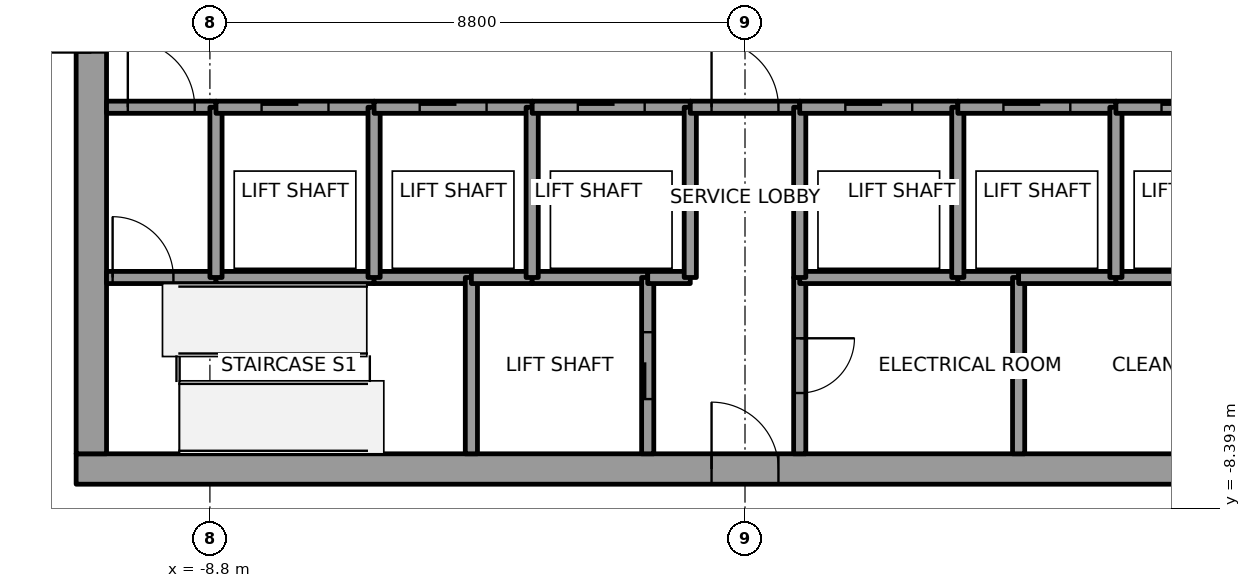
"""IFC4 building model, lengths in metres.
Left out: names, types, materials, properties, quantities, classifications, styles, units other than length and angle.
Written with IfcOpenShell. Run it as: python <this file> out.ifc"""

import sys

from ifc_helpers import new_model, si_unit, direction, frame, frame_2d, origin, place, context, subcontext, project, spatial, rectangle, extrude, element, fill, save


model = new_model("IFC4")
c1 = context("Model", 3, precision=1e-05, world=origin(), true_north=direction((0.0, 1.0)))
c2 = subcontext(c1, "Body", "Model", "MODEL_VIEW")
j1 = project(units=[si_unit("LENGTHUNIT", "METRE"), si_unit("PLANEANGLEUNIT", "RADIAN")], contexts=[c1])
p1 = place(None, origin())
s1 = spatial("IfcSite", under=j1, at=p1, CompositionType="ELEMENT")
p2 = place(p1, origin())
s2 = spatial("IfcBuilding", under=s1, at=p2, CompositionType="ELEMENT")
p3 = place(p2, frame((0.0, 0.0, 235.0)))
s3 = spatial("IfcBuildingStorey", under=s2, at=p3, CompositionType="ELEMENT", Elevation=235.0)
p4 = place(p3, frame((-11.0, -7.75, 0.0), z_axis=(0.0, 0.0, 1.0), x_axis=(1.0, 0.0, 0.0)))
e1 = element("IfcWall", 1, at=p4, inside=s3, PredefinedType="SHEAR", context=c2, shape_type="SweptSolid", body=[
    extrude(rectangle(XDim=22.0, YDim=0.5, at=frame_2d((11.0, 0.0))), origin(), (0.0, 0.0, 1.0), 4.0),
])
p5 = place(p4, frame((10.45, 0.0, 0.0)))
e2 = element("IfcOpeningElement", 2, at=p5, cuts=e1, PredefinedType="OPENING", context=c2, shape_type="SweptSolid", body=[
    extrude(rectangle(XDim=1.1, YDim=2.1, at=frame_2d((0.55, 1.05))), frame((0.0, 0.25, 0.0), z_axis=(0.0, -1.0, 0.0), x_axis=(1.0, 0.0, 0.0)), (0.0, 0.0, 1.0), 0.5),
])
p6 = place(p3, frame((-10.75, -7.5, 0.0), z_axis=(0.0, 0.0, 1.0), x_axis=(0.0, 1.0, 0.0)))
e3 = element("IfcWall", 3, at=p6, inside=s3, PredefinedType="SHEAR", context=c2, shape_type="SweptSolid", body=[
    extrude(rectangle(XDim=15.0, YDim=0.5, at=frame_2d((7.5, 0.0))), origin(), (0.0, 0.0, 1.0), 4.0),
])
p7 = place(p6, frame((6.6, 0.0, 0.0)))
e4 = element("IfcOpeningElement", 4, at=p7, cuts=e3, PredefinedType="OPENING", context=c2, shape_type="SweptSolid", body=[
    extrude(rectangle(XDim=1.8, YDim=2.1, at=frame_2d((0.9, 1.05))), frame((0.0, 0.25, 0.0), z_axis=(0.0, -1.0, 0.0), x_axis=(1.0, 0.0, 0.0)), (0.0, 0.0, 1.0), 0.5),
])
p8 = place(p3, frame((-10.5, -4.6, 0.0), z_axis=(0.0, 0.0, 1.0), x_axis=(1.0, 0.0, 0.0)))
e5 = element("IfcWall", 5, at=p8, inside=s3, PredefinedType="SOLIDWALL", context=c2, shape_type="SweptSolid", body=[
    extrude(rectangle(XDim=1.8, YDim=0.2, at=frame_2d((0.9, 0.0))), origin(), (0.0, 0.0, 1.0), 3.85),
])
p9 = place(p8, frame((0.1, 0.0, 0.0)))
e6 = element("IfcOpeningElement", 6, at=p9, cuts=e5, PredefinedType="OPENING", context=c2, shape_type="SweptSolid", body=[
    extrude(rectangle(XDim=1.0, YDim=2.1, at=frame_2d((0.5, 1.05))), frame((0.0, 0.1, 0.0), z_axis=(0.0, -1.0, 0.0), x_axis=(1.0, 0.0, 0.0)), (0.0, 0.0, 1.0), 0.2),
])
p10 = place(p3, frame((-10.5, -1.8, 0.0), z_axis=(0.0, 0.0, 1.0), x_axis=(1.0, 0.0, 0.0)))
e7 = element("IfcWall", 7, at=p10, inside=s3, PredefinedType="SOLIDWALL", context=c2, shape_type="SweptSolid", body=[
    extrude(rectangle(XDim=1.8, YDim=0.2, at=frame_2d((0.9, 0.0))), origin(), (0.0, 0.0, 1.0), 3.85),
])
p11 = place(p10, frame((0.35, 0.0, 0.0)))
e8 = element("IfcOpeningElement", 8, at=p11, cuts=e7, PredefinedType="OPENING", context=c2, shape_type="SweptSolid", body=[
    extrude(rectangle(XDim=1.1, YDim=2.1, at=frame_2d((0.55, 1.05))), frame((0.0, 0.1, 0.0), z_axis=(0.0, -1.0, 0.0), x_axis=(1.0, 0.0, 0.0)), (0.0, 0.0, 1.0), 0.2),
])
p12 = place(p3, frame((-8.7, -4.6, 0.0), z_axis=(0.0, 0.0, 1.0), x_axis=(1.0, 0.0, 0.0)))
e9 = element("IfcWall", 9, at=p12, inside=s3, PredefinedType="SOLIDWALL", context=c2, shape_type="SweptSolid", body=[
    extrude(rectangle(XDim=2.6, YDim=0.2, at=frame_2d((1.3, 0.0))), origin(), (0.0, 0.0, 1.0), 3.85),
])
p13 = place(p3, frame((-8.7, -4.6, 0.0), z_axis=(0.0, 0.0, 1.0), x_axis=(0.0, 1.0, 0.0)))
e10 = element("IfcWall", 10, at=p13, inside=s3, PredefinedType="SOLIDWALL", context=c2, shape_type="SweptSolid", body=[
    extrude(rectangle(XDim=2.8, YDim=0.2, at=frame_2d((1.4, 0.0))), origin(), (0.0, 0.0, 1.0), 3.85),
])
p14 = place(p3, frame((-8.7, -1.8, 0.0), z_axis=(0.0, 0.0, 1.0), x_axis=(1.0, 0.0, 0.0)))
e11 = element("IfcWall", 11, at=p14, inside=s3, PredefinedType="SOLIDWALL", context=c2, shape_type="SweptSolid", body=[
    extrude(rectangle(XDim=2.6, YDim=0.2, at=frame_2d((1.3, 0.0))), origin(), (0.0, 0.0, 1.0), 3.85),
])
p15 = place(p14, frame((0.75, 0.0, 0.0)))
e12 = element("IfcOpeningElement", 12, at=p15, cuts=e11, PredefinedType="OPENING", context=c2, shape_type="SweptSolid", body=[
    extrude(rectangle(XDim=1.1, YDim=2.1, at=frame_2d((0.55, 1.05))), frame((0.0, 0.1, 0.0), z_axis=(0.0, -1.0, 0.0), x_axis=(1.0, 0.0, 0.0)), (0.0, 0.0, 1.0), 0.2),
])
p16 = place(p3, frame((-6.1, -4.6, 0.0), z_axis=(0.0, 0.0, 1.0), x_axis=(1.0, 0.0, 0.0)))
e13 = element("IfcWall", 13, at=p16, inside=s3, PredefinedType="SOLIDWALL", context=c2, shape_type="SweptSolid", body=[
    extrude(rectangle(XDim=1.6, YDim=0.2, at=frame_2d((0.8, 0.0))), origin(), (0.0, 0.0, 1.0), 3.85),
])
p17 = place(p3, frame((-6.1, -4.6, 0.0), z_axis=(0.0, 0.0, 1.0), x_axis=(0.0, 1.0, 0.0)))
e14 = element("IfcWall", 14, at=p17, inside=s3, PredefinedType="SOLIDWALL", context=c2, shape_type="SweptSolid", body=[
    extrude(rectangle(XDim=2.8, YDim=0.2, at=frame_2d((1.4, 0.0))), origin(), (0.0, 0.0, 1.0), 3.85),
])
p18 = place(p3, frame((-6.1, -1.8, 0.0), z_axis=(0.0, 0.0, 1.0), x_axis=(1.0, 0.0, 0.0)))
e15 = element("IfcWall", 15, at=p18, inside=s3, PredefinedType="SOLIDWALL", context=c2, shape_type="SweptSolid", body=[
    extrude(rectangle(XDim=2.6, YDim=0.2, at=frame_2d((1.3, 0.0))), origin(), (0.0, 0.0, 1.0), 3.85),
])
p19 = place(p18, frame((0.75, 0.0, 0.0)))
e16 = element("IfcOpeningElement", 16, at=p19, cuts=e15, PredefinedType="OPENING", context=c2, shape_type="SweptSolid", body=[
    extrude(rectangle(XDim=1.1, YDim=2.1, at=frame_2d((0.55, 1.05))), frame((0.0, 0.1, 0.0), z_axis=(0.0, -1.0, 0.0), x_axis=(1.0, 0.0, 0.0)), (0.0, 0.0, 1.0), 0.2),
])
p20 = place(p3, frame((-4.5, -4.6, 0.0), z_axis=(0.0, 0.0, 1.0), x_axis=(0.0, -1.0, 0.0)))
e17 = element("IfcWall", 17, at=p20, inside=s3, PredefinedType="SOLIDWALL", context=c2, shape_type="SweptSolid", body=[
    extrude(rectangle(XDim=2.9, YDim=0.2, at=frame_2d((1.45, 0.0))), origin(), (0.0, 0.0, 1.0), 3.85),
])
p21 = place(p3, frame((-4.5, -4.6, 0.0), z_axis=(0.0, 0.0, 1.0), x_axis=(1.0, 0.0, 0.0)))
e18 = element("IfcWall", 18, at=p21, inside=s3, PredefinedType="SOLIDWALL", context=c2, shape_type="SweptSolid", body=[
    extrude(rectangle(XDim=1.0, YDim=0.2, at=frame_2d((0.5, 0.0))), origin(), (0.0, 0.0, 1.0), 3.85),
])
p22 = place(p3, frame((-3.5, -4.6, 0.0), z_axis=(0.0, 0.0, 1.0), x_axis=(1.0, 0.0, 0.0)))
e19 = element("IfcWall", 19, at=p22, inside=s3, PredefinedType="SOLIDWALL", context=c2, shape_type="SweptSolid", body=[
    extrude(rectangle(XDim=1.9, YDim=0.2, at=frame_2d((0.95, 0.0))), origin(), (0.0, 0.0, 1.0), 3.85),
])
p23 = place(p3, frame((-3.5, -4.6, 0.0), z_axis=(0.0, 0.0, 1.0), x_axis=(0.0, 1.0, 0.0)))
e20 = element("IfcWall", 20, at=p23, inside=s3, PredefinedType="SOLIDWALL", context=c2, shape_type="SweptSolid", body=[
    extrude(rectangle(XDim=2.8, YDim=0.2, at=frame_2d((1.4, 0.0))), origin(), (0.0, 0.0, 1.0), 3.85),
])
p24 = place(p3, frame((-3.5, -1.8, 0.0), z_axis=(0.0, 0.0, 1.0), x_axis=(1.0, 0.0, 0.0)))
e21 = element("IfcWall", 21, at=p24, inside=s3, PredefinedType="SOLIDWALL", context=c2, shape_type="SweptSolid", body=[
    extrude(rectangle(XDim=2.6, YDim=0.2, at=frame_2d((1.3, 0.0))), origin(), (0.0, 0.0, 1.0), 3.85),
])
p25 = place(p24, frame((0.75, 0.0, 0.0)))
e22 = element("IfcOpeningElement", 22, at=p25, cuts=e21, PredefinedType="OPENING", context=c2, shape_type="SweptSolid", body=[
    extrude(rectangle(XDim=1.1, YDim=2.1, at=frame_2d((0.55, 1.05))), frame((0.0, 0.1, 0.0), z_axis=(0.0, -1.0, 0.0), x_axis=(1.0, 0.0, 0.0)), (0.0, 0.0, 1.0), 0.2),
])
p26 = place(p3, frame((-1.6, -7.5, 0.0), z_axis=(0.0, 0.0, 1.0), x_axis=(0.0, 1.0, 0.0)))
e23 = element("IfcWall", 23, at=p26, inside=s3, PredefinedType="SOLIDWALL", context=c2, shape_type="SweptSolid", body=[
    extrude(rectangle(XDim=2.9, YDim=0.2, at=frame_2d((1.45, 0.0))), origin(), (0.0, 0.0, 1.0), 3.85),
])
p27 = place(p26, frame((0.9, 0.0, 0.0)))
e24 = element("IfcOpeningElement", 24, at=p27, cuts=e23, PredefinedType="OPENING", context=c2, shape_type="SweptSolid", body=[
    extrude(rectangle(XDim=1.1, YDim=2.1, at=frame_2d((0.55, 1.05))), frame((0.0, 0.1, 0.0), z_axis=(0.0, -1.0, 0.0), x_axis=(1.0, 0.0, 0.0)), (0.0, 0.0, 1.0), 0.2),
])
p28 = place(p3, frame((-1.6, -4.6, 0.0), z_axis=(0.0, 0.0, 1.0), x_axis=(1.0, 0.0, 0.0)))
e25 = element("IfcWall", 25, at=p28, inside=s3, PredefinedType="SOLIDWALL", context=c2, shape_type="SweptSolid", body=[
    extrude(rectangle(XDim=0.7, YDim=0.2, at=frame_2d((0.35, 0.0))), origin(), (0.0, 0.0, 1.0), 3.85),
])
p29 = place(p3, frame((-0.9, -4.6, 0.0), z_axis=(0.0, 0.0, 1.0), x_axis=(0.0, 1.0, 0.0)))
e26 = element("IfcWall", 26, at=p29, inside=s3, PredefinedType="SOLIDWALL", context=c2, shape_type="SweptSolid", body=[
    extrude(rectangle(XDim=2.8, YDim=0.2, at=frame_2d((1.4, 0.0))), origin(), (0.0, 0.0, 1.0), 3.85),
])
p30 = place(p3, frame((-0.9, -1.8, 0.0), z_axis=(0.0, 0.0, 1.0), x_axis=(1.0, 0.0, 0.0)))
e27 = element("IfcWall", 27, at=p30, inside=s3, PredefinedType="SOLIDWALL", context=c2, shape_type="SweptSolid", body=[
    extrude(rectangle(XDim=1.8, YDim=0.2, at=frame_2d((0.9, 0.0))), origin(), (0.0, 0.0, 1.0), 3.85),
])
p31 = place(p30, frame((0.35, 0.0, 0.0)))
e28 = element("IfcOpeningElement", 28, at=p31, cuts=e27, PredefinedType="OPENING", context=c2, shape_type="SweptSolid", body=[
    extrude(rectangle(XDim=1.1, YDim=2.1, at=frame_2d((0.55, 1.05))), frame((0.0, 0.1, 0.0), z_axis=(0.0, -1.0, 0.0), x_axis=(1.0, 0.0, 0.0)), (0.0, 0.0, 1.0), 0.2),
])
p32 = place(p3, frame((0.9, -4.6, 0.0), z_axis=(0.0, 0.0, 1.0), x_axis=(0.0, -1.0, 0.0)))
e29 = element("IfcWall", 29, at=p32, inside=s3, PredefinedType="SOLIDWALL", context=c2, shape_type="SweptSolid", body=[
    extrude(rectangle(XDim=2.9, YDim=0.2, at=frame_2d((1.45, 0.0))), origin(), (0.0, 0.0, 1.0), 3.85),
])
p33 = place(p32, frame((1.0, 0.0, 0.0)))
e30 = element("IfcOpeningElement", 30, at=p33, cuts=e29, PredefinedType="OPENING", context=c2, shape_type="SweptSolid", body=[
    extrude(rectangle(XDim=0.9, YDim=2.1, at=frame_2d((0.45, 1.05))), frame((0.0, 0.1, 0.0), z_axis=(0.0, -1.0, 0.0), x_axis=(1.0, 0.0, 0.0)), (0.0, 0.0, 1.0), 0.2),
])
p34 = place(p3, frame((3.5, -4.6, 0.0), z_axis=(0.0, 0.0, 1.0), x_axis=(-1.0, 0.0, 0.0)))
e31 = element("IfcWall", 31, at=p34, inside=s3, PredefinedType="SOLIDWALL", context=c2, shape_type="SweptSolid", body=[
    extrude(rectangle(XDim=2.6, YDim=0.2, at=frame_2d((1.3, 0.0))), origin(), (0.0, 0.0, 1.0), 3.85),
])
p35 = place(p3, frame((0.9, -1.8, 0.0), z_axis=(0.0, 0.0, 1.0), x_axis=(0.0, -1.0, 0.0)))
e32 = element("IfcWall", 32, at=p35, inside=s3, PredefinedType="SOLIDWALL", context=c2, shape_type="SweptSolid", body=[
    extrude(rectangle(XDim=2.8, YDim=0.2, at=frame_2d((1.4, 0.0))), origin(), (0.0, 0.0, 1.0), 3.85),
])
p36 = place(p3, frame((0.9, -1.8, 0.0), z_axis=(0.0, 0.0, 1.0), x_axis=(1.0, 0.0, 0.0)))
e33 = element("IfcWall", 33, at=p36, inside=s3, PredefinedType="SOLIDWALL", context=c2, shape_type="SweptSolid", body=[
    extrude(rectangle(XDim=2.6, YDim=0.2, at=frame_2d((1.3, 0.0))), origin(), (0.0, 0.0, 1.0), 3.85),
])
p37 = place(p36, frame((0.75, 0.0, 0.0)))
e34 = element("IfcOpeningElement", 34, at=p37, cuts=e33, PredefinedType="OPENING", context=c2, shape_type="SweptSolid", body=[
    extrude(rectangle(XDim=1.1, YDim=2.1, at=frame_2d((0.55, 1.05))), frame((0.0, 0.1, 0.0), z_axis=(0.0, -1.0, 0.0), x_axis=(1.0, 0.0, 0.0)), (0.0, 0.0, 1.0), 0.2),
])
p38 = place(p3, frame((4.5, -4.6, 0.0), z_axis=(0.0, 0.0, 1.0), x_axis=(-1.0, 0.0, 0.0)))
e35 = element("IfcWall", 35, at=p38, inside=s3, PredefinedType="SOLIDWALL", context=c2, shape_type="SweptSolid", body=[
    extrude(rectangle(XDim=1.0, YDim=0.2, at=frame_2d((0.5, 0.0))), origin(), (0.0, 0.0, 1.0), 3.85),
])
p39 = place(p3, frame((3.5, -4.6, 0.0), z_axis=(0.0, 0.0, 1.0), x_axis=(0.0, 1.0, 0.0)))
e36 = element("IfcWall", 36, at=p39, inside=s3, PredefinedType="SOLIDWALL", context=c2, shape_type="SweptSolid", body=[
    extrude(rectangle(XDim=2.8, YDim=0.2, at=frame_2d((1.4, 0.0))), origin(), (0.0, 0.0, 1.0), 3.85),
])
p40 = place(p3, frame((3.5, -1.8, 0.0), z_axis=(0.0, 0.0, 1.0), x_axis=(1.0, 0.0, 0.0)))
e37 = element("IfcWall", 37, at=p40, inside=s3, PredefinedType="SOLIDWALL", context=c2, shape_type="SweptSolid", body=[
    extrude(rectangle(XDim=2.6, YDim=0.2, at=frame_2d((1.3, 0.0))), origin(), (0.0, 0.0, 1.0), 3.85),
])
p41 = place(p40, frame((0.75, 0.0, 0.0)))
e38 = element("IfcOpeningElement", 38, at=p41, cuts=e37, PredefinedType="OPENING", context=c2, shape_type="SweptSolid", body=[
    extrude(rectangle(XDim=1.1, YDim=2.1, at=frame_2d((0.55, 1.05))), frame((0.0, 0.1, 0.0), z_axis=(0.0, -1.0, 0.0), x_axis=(1.0, 0.0, 0.0)), (0.0, 0.0, 1.0), 0.2),
])
p42 = place(p3, frame((4.5, -4.6, 0.0), z_axis=(0.0, 0.0, 1.0), x_axis=(0.0, -1.0, 0.0)))
e39 = element("IfcWall", 39, at=p42, inside=s3, PredefinedType="SOLIDWALL", context=c2, shape_type="SweptSolid", body=[
    extrude(rectangle(XDim=2.9, YDim=0.2, at=frame_2d((1.45, 0.0))), origin(), (0.0, 0.0, 1.0), 3.85),
])
p43 = place(p3, frame((6.1, -4.6, 0.0), z_axis=(0.0, 0.0, 1.0), x_axis=(-1.0, 0.0, 0.0)))
e40 = element("IfcWall", 40, at=p43, inside=s3, PredefinedType="SOLIDWALL", context=c2, shape_type="SweptSolid", body=[
    extrude(rectangle(XDim=1.6, YDim=0.2, at=frame_2d((0.8, 0.0))), origin(), (0.0, 0.0, 1.0), 3.85),
])
p44 = place(p3, frame((8.7, -4.6, 0.0), z_axis=(0.0, 0.0, 1.0), x_axis=(-1.0, 0.0, 0.0)))
e41 = element("IfcWall", 41, at=p44, inside=s3, PredefinedType="SOLIDWALL", context=c2, shape_type="SweptSolid", body=[
    extrude(rectangle(XDim=2.6, YDim=0.2, at=frame_2d((1.3, 0.0))), origin(), (0.0, 0.0, 1.0), 3.85),
])
p45 = place(p3, frame((6.1, -4.6, 0.0), z_axis=(0.0, 0.0, 1.0), x_axis=(0.0, 1.0, 0.0)))
e42 = element("IfcWall", 42, at=p45, inside=s3, PredefinedType="SOLIDWALL", context=c2, shape_type="SweptSolid", body=[
    extrude(rectangle(XDim=2.8, YDim=0.2, at=frame_2d((1.4, 0.0))), origin(), (0.0, 0.0, 1.0), 3.85),
])
p46 = place(p3, frame((6.1, -1.8, 0.0), z_axis=(0.0, 0.0, 1.0), x_axis=(1.0, 0.0, 0.0)))
e43 = element("IfcWall", 43, at=p46, inside=s3, PredefinedType="SOLIDWALL", context=c2, shape_type="SweptSolid", body=[
    extrude(rectangle(XDim=2.6, YDim=0.2, at=frame_2d((1.3, 0.0))), origin(), (0.0, 0.0, 1.0), 3.85),
])
p47 = place(p46, frame((0.75, 0.0, 0.0)))
e44 = element("IfcOpeningElement", 44, at=p47, cuts=e43, PredefinedType="OPENING", context=c2, shape_type="SweptSolid", body=[
    extrude(rectangle(XDim=1.1, YDim=2.1, at=frame_2d((0.55, 1.05))), frame((0.0, 0.1, 0.0), z_axis=(0.0, -1.0, 0.0), x_axis=(1.0, 0.0, 0.0)), (0.0, 0.0, 1.0), 0.2),
])
p48 = place(p15, origin())
e45 = element("IfcDoor", 45, at=p48, inside=s3, OperationType="SLIDING_TO_RIGHT", PredefinedType="DOOR", context=c2, shape_type="SweptSolid", body=[
    extrude(rectangle(XDim=1.1, YDim=2.1, at=frame_2d((0.55, 1.05))), frame((0.0, 0.025, 0.0), z_axis=(0.0, -1.0, 0.0), x_axis=(1.0, 0.0, 0.0)), (0.0, 0.0, 1.0), 0.05),
])
fill(e12, e45)
p49 = place(p19, origin())
e46 = element("IfcDoor", 46, at=p49, inside=s3, OperationType="SLIDING_TO_RIGHT", PredefinedType="DOOR", context=c2, shape_type="SweptSolid", body=[
    extrude(rectangle(XDim=1.1, YDim=2.1, at=frame_2d((0.55, 1.05))), frame((0.0, 0.025, 0.0), z_axis=(0.0, -1.0, 0.0), x_axis=(1.0, 0.0, 0.0)), (0.0, 0.0, 1.0), 0.05),
])
fill(e16, e46)
p50 = place(p25, origin())
e47 = element("IfcDoor", 47, at=p50, inside=s3, OperationType="SLIDING_TO_RIGHT", PredefinedType="DOOR", context=c2, shape_type="SweptSolid", body=[
    extrude(rectangle(XDim=1.1, YDim=2.1, at=frame_2d((0.55, 1.05))), frame((0.0, 0.025, 0.0), z_axis=(0.0, -1.0, 0.0), x_axis=(1.0, 0.0, 0.0)), (0.0, 0.0, 1.0), 0.05),
])
fill(e22, e47)
p51 = place(p37, origin())
e48 = element("IfcDoor", 48, at=p51, inside=s3, OperationType="SLIDING_TO_LEFT", PredefinedType="DOOR", context=c2, shape_type="SweptSolid", body=[
    extrude(rectangle(XDim=1.1, YDim=2.1, at=frame_2d((0.55, 1.05))), frame((0.0, 0.025, 0.0), z_axis=(0.0, -1.0, 0.0), x_axis=(1.0, 0.0, 0.0)), (0.0, 0.0, 1.0), 0.05),
])
fill(e34, e48)
p52 = place(p41, origin())
e49 = element("IfcDoor", 49, at=p52, inside=s3, OperationType="SLIDING_TO_RIGHT", PredefinedType="DOOR", context=c2, shape_type="SweptSolid", body=[
    extrude(rectangle(XDim=1.1, YDim=2.1, at=frame_2d((0.55, 1.05))), frame((0.0, 0.025, 0.0), z_axis=(0.0, -1.0, 0.0), x_axis=(1.0, 0.0, 0.0)), (0.0, 0.0, 1.0), 0.05),
])
fill(e38, e49)
p53 = place(p47, origin())
e50 = element("IfcDoor", 50, at=p53, inside=s3, OperationType="SLIDING_TO_RIGHT", PredefinedType="DOOR", context=c2, shape_type="SweptSolid", body=[
    extrude(rectangle(XDim=1.1, YDim=2.1, at=frame_2d((0.55, 1.05))), frame((0.0, 0.025, 0.0), z_axis=(0.0, -1.0, 0.0), x_axis=(1.0, 0.0, 0.0)), (0.0, 0.0, 1.0), 0.05),
])
fill(e44, e50)
p54 = place(p27, origin())
e51 = element("IfcDoor", 51, at=p54, inside=s3, OperationType="SLIDING_TO_RIGHT", PredefinedType="DOOR", context=c2, shape_type="SweptSolid", body=[
    extrude(rectangle(XDim=1.1, YDim=2.1, at=frame_2d((0.55, 1.05))), frame((0.0, 0.025, 0.0), z_axis=(0.0, -1.0, 0.0), x_axis=(1.0, 0.0, 0.0)), (0.0, 0.0, 1.0), 0.05),
])
fill(e24, e51)
p55 = place(p11, origin())
e52 = element("IfcDoor", 52, at=p55, inside=s3, OperationType="SINGLE_SWING_RIGHT", PredefinedType="DOOR", context=c2, shape_type="SweptSolid", body=[
    extrude(rectangle(XDim=1.1, YDim=2.1, at=frame_2d((0.55, 1.05))), frame((0.0, 0.025, 0.0), z_axis=(0.0, -1.0, 0.0), x_axis=(1.0, 0.0, 0.0)), (0.0, 0.0, 1.0), 0.05),
])
fill(e8, e52)
p56 = place(p31, origin())
e53 = element("IfcDoor", 53, at=p56, inside=s3, OperationType="SINGLE_SWING_RIGHT", PredefinedType="DOOR", context=c2, shape_type="SweptSolid", body=[
    extrude(rectangle(XDim=1.1, YDim=2.1, at=frame_2d((0.55, 1.05))), frame((0.0, 0.025, 0.0), z_axis=(0.0, -1.0, 0.0), x_axis=(1.0, 0.0, 0.0)), (0.0, 0.0, 1.0), 0.05),
])
fill(e28, e53)
p57 = place(p9, origin())
e54 = element("IfcDoor", 54, at=p57, inside=s3, OperationType="SINGLE_SWING_LEFT", PredefinedType="DOOR", context=c2, shape_type="SweptSolid", body=[
    extrude(rectangle(XDim=1.0, YDim=2.1, at=frame_2d((0.5, 1.05))), frame((0.0, 0.025, 0.0), z_axis=(0.0, -1.0, 0.0), x_axis=(1.0, 0.0, 0.0)), (0.0, 0.0, 1.0), 0.05),
])
fill(e6, e54)
p58 = place(p33, origin())
e55 = element("IfcDoor", 55, at=p58, inside=s3, OperationType="SINGLE_SWING_LEFT", PredefinedType="DOOR", context=c2, shape_type="SweptSolid", body=[
    extrude(rectangle(XDim=0.9, YDim=2.1, at=frame_2d((0.45, 1.05))), frame((0.0, 0.025, 0.0), z_axis=(0.0, -1.0, 0.0), x_axis=(1.0, 0.0, 0.0)), (0.0, 0.0, 1.0), 0.05),
])
fill(e30, e55)
p59 = place(p7, origin())
e56 = element("IfcDoor", 56, at=p59, inside=s3, OperationType="DOUBLE_DOOR_SINGLE_SWING", PredefinedType="DOOR", context=c2, shape_type="SweptSolid", body=[
    extrude(rectangle(XDim=1.8, YDim=2.1, at=frame_2d((0.9, 1.05))), frame((0.0, 0.025, 0.0), z_axis=(0.0, -1.0, 0.0), x_axis=(1.0, 0.0, 0.0)), (0.0, 0.0, 1.0), 0.05),
])
fill(e4, e56)
p60 = place(p5, origin())
e57 = element("IfcDoor", 57, at=p60, inside=s3, OperationType="SINGLE_SWING_LEFT", PredefinedType="DOOR", context=c2, shape_type="SweptSolid", body=[
    extrude(rectangle(XDim=1.1, YDim=2.1, at=frame_2d((0.55, 1.05))), frame((0.0, 0.025, 0.0), z_axis=(0.0, -1.0, 0.0), x_axis=(1.0, 0.0, 0.0)), (0.0, 0.0, 1.0), 0.05),
])
fill(e2, e57)
save(model, sys.argv[1])
